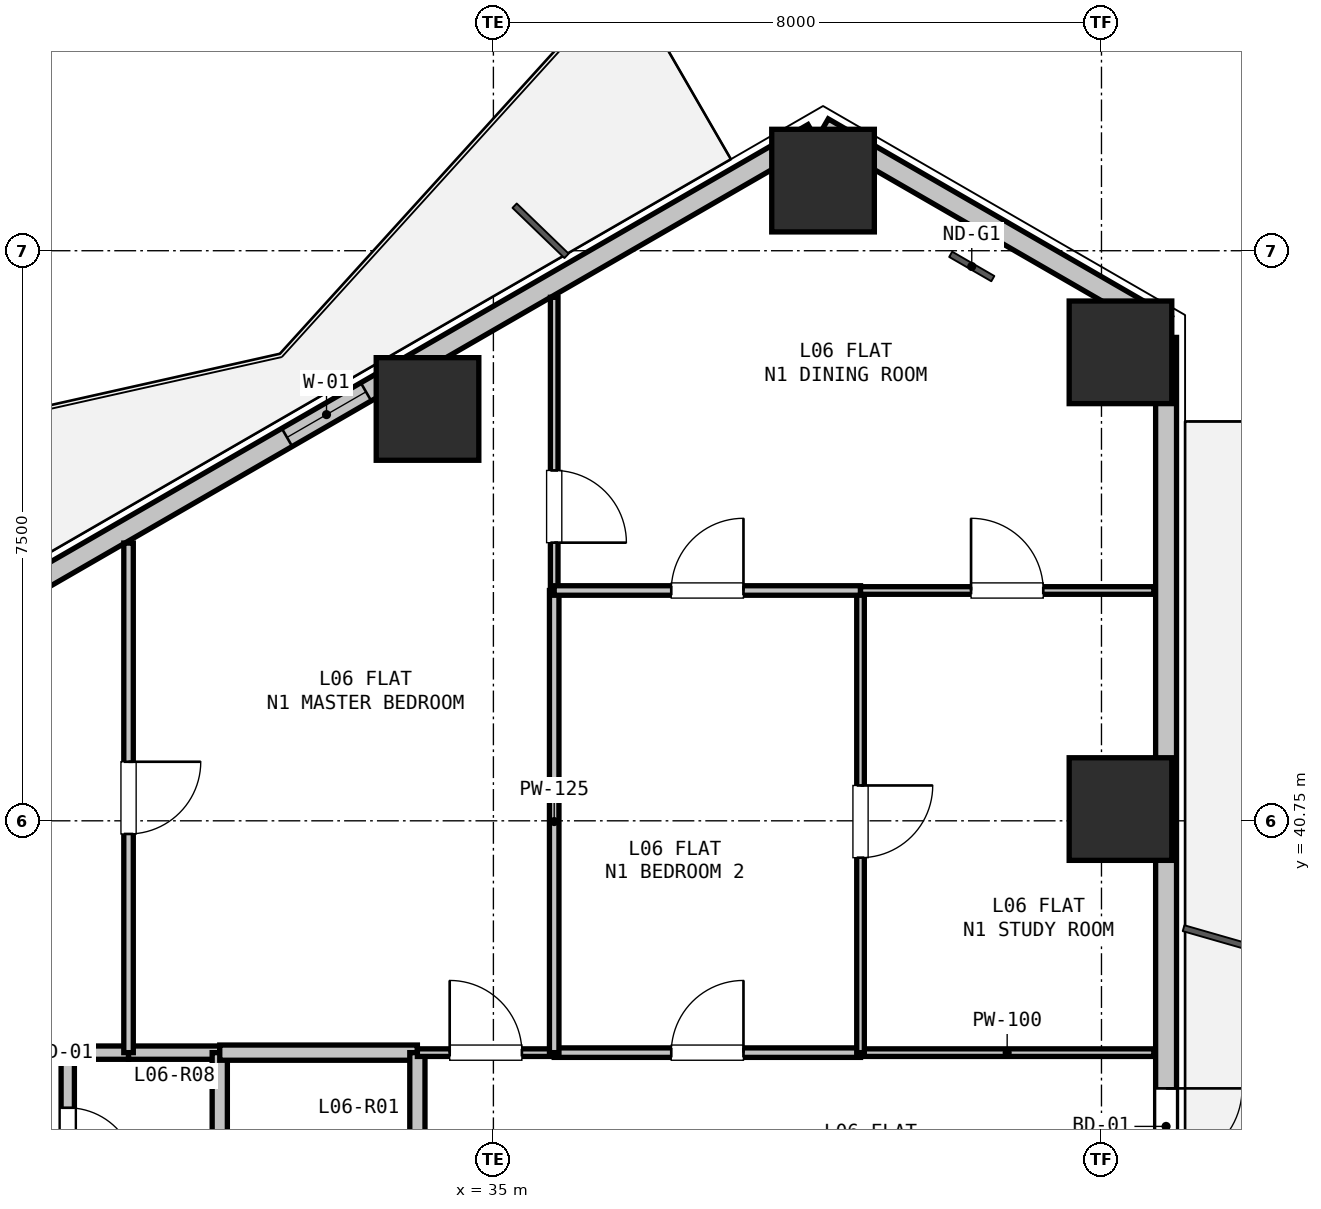
"""IFC4 building model, lengths in metres.
Left out: names, types, materials, properties, quantities, classifications, styles, units other than length and angle.
Written with IfcOpenShell. Run it as: python <this file> out.ifc"""

import sys

from ifc_helpers import new_model, si_unit, direction, frame, frame_2d, origin, origin_2d, place, context, subcontext, project, spatial, rectangle, hollow_rectangle, extrude, element, fill, save


model = new_model("IFC4")
c1 = context("Model", 3, precision=1e-05, world=origin(), true_north=direction((0.0, 1.0)))
c2 = subcontext(c1, "Body", "Model", "MODEL_VIEW")
j1 = project(units=[si_unit("LENGTHUNIT", "METRE"), si_unit("PLANEANGLEUNIT", "RADIAN")], contexts=[c1])
p1 = place(None, origin())
s1 = spatial("IfcSite", under=j1, at=p1, CompositionType="ELEMENT")
p2 = place(p1, origin())
s2 = spatial("IfcBuilding", under=s1, at=p2, CompositionType="ELEMENT")
p3 = place(p2, frame((0.0, 0.0, 25.8)))
s3 = spatial("IfcBuildingStorey", under=s2, at=p3, CompositionType="ELEMENT", Elevation=25.8)
for number, where, z_axis, x_axis in (
    (1, (34.133, 46.168, 0.0), (0.0, 0.0, 1.0), (1.0, 0.0, 0.0)),
    (2, (39.337, 49.173, 0.0), (0.0, 0.0, 1.0), (1.0, 0.0, 0.0)),
    (3, (43.25, 46.913, 0.0), (0.0, 0.0, 1.0), (1.0, 0.0, 0.0)),
    (4, (43.25, 40.905, 0.0), (0.0, 0.0, 1.0), (1.0, 0.0, 0.0)),
):
    element("IfcColumn", number, at=place(p3, frame(where, z_axis=z_axis, x_axis=x_axis)), inside=s3, PredefinedType="COLUMN", context=c2, shape_type="SweptSolid", body=[
        extrude(hollow_rectangle(XDim=1.35, YDim=1.35, WallThickness=0.036, at=origin_2d()), origin(), (0.0, 0.0, 1.0), 3.3),
    ])
p4 = place(p3, frame((39.337, 49.865, 0.0), z_axis=(0.0, 0.0, 1.0), x_axis=(0.866043601342, -0.499968479581, 0.0)))
e5 = element("IfcWall", 5, at=p4, inside=s3, PredefinedType="SOLIDWALL", context=c2, shape_type="SweptSolid", body=[
    extrude(rectangle(XDim=5.211, YDim=0.275, at=frame_2d((2.605, 0.0))), origin(), (0.0, 0.0, 1.0), 2.66),
])
p5 = place(p3, frame((28.232, 43.454, 0.0), z_axis=(0.0, 0.0, 1.0), x_axis=(0.86603192154, 0.499988710747, 0.0)))
e6 = element("IfcWall", 6, at=p5, inside=s3, PredefinedType="SOLIDWALL", context=c2, shape_type="SweptSolid", body=[
    extrude(rectangle(XDim=12.673, YDim=0.275, at=frame_2d((6.336, 0.0))), origin(), (0.0, 0.0, 1.0), 2.66),
])
p6 = place(p5, frame((4.68, 0.0, 0.9)))
e7 = element("IfcOpeningElement", 7, at=p6, cuts=e6, PredefinedType="OPENING", context=c2, shape_type="SweptSolid", body=[
    extrude(rectangle(XDim=1.2, YDim=1.4, at=frame_2d((0.6, 0.7))), frame((0.0, 0.147, 0.0), z_axis=(0.0, -1.0, 0.0), x_axis=(1.0, 0.0, 0.0)), (0.0, 0.0, 1.0), 0.295),
])
p7 = place(p3, frame((43.85, 47.11, 0.0), z_axis=(0.0, 0.0, 1.0), x_axis=(0.0, -1.0, 0.0)))
e8 = element("IfcWall", 8, at=p7, inside=s3, PredefinedType="SOLIDWALL", context=c2, shape_type="SweptSolid", body=[
    extrude(rectangle(XDim=12.673, YDim=0.275, at=frame_2d((6.336, 0.0))), origin(), (0.0, 0.0, 1.0), 2.66),
])
p8 = place(p7, frame((9.88, 0.0, 0.0)))
e9 = element("IfcOpeningElement", 9, at=p8, cuts=e8, PredefinedType="OPENING", context=c2, shape_type="SweptSolid", body=[
    extrude(rectangle(XDim=1.0, YDim=2.1, at=frame_2d((0.5, 1.05))), frame((0.0, 0.147, 0.0), z_axis=(0.0, -1.0, 0.0), x_axis=(1.0, 0.0, 0.0)), (0.0, 0.0, 1.0), 0.295),
])
p9 = place(p3, frame((26.8, 37.7, 0.0), z_axis=(0.0, 0.0, 1.0), x_axis=(1.0, 0.0, 0.0)))
e10 = element("IfcWall", 10, at=p9, inside=s3, PredefinedType="PARTITIONING", context=c2, shape_type="SweptSolid", body=[
    extrude(rectangle(XDim=2.6, YDim=0.1, at=frame_2d((1.3, 0.0))), origin(), (0.0, 0.0, 1.0), 3.04),
])
p10 = place(p9, frame((0.825, 0.0, 0.0)))
e11 = element("IfcOpeningElement", 11, at=p10, cuts=e10, PredefinedType="OPENING", context=c2, shape_type="SweptSolid", body=[
    extrude(rectangle(XDim=0.95, YDim=2.1, at=frame_2d((0.475, 1.05))), frame((0.0, 0.06, 0.0), z_axis=(0.0, -1.0, 0.0), x_axis=(1.0, 0.0, 0.0)), (0.0, 0.0, 1.0), 0.12),
])
p11 = place(p3, frame((29.4, 37.7, 0.0), z_axis=(0.0, 0.0, 1.0), x_axis=(0.0, -1.0, 0.0)))
e12 = element("IfcWall", 12, at=p11, inside=s3, PredefinedType="PLUMBINGWALL", context=c2, shape_type="SweptSolid", body=[
    extrude(rectangle(XDim=2.35, YDim=0.175, at=frame_2d((1.175, 0.0))), origin(), (0.0, 0.0, 1.0), 3.04),
])
p12 = place(p11, frame((0.725, 0.0, 0.0)))
e13 = element("IfcOpeningElement", 13, at=p12, cuts=e12, PredefinedType="OPENING", context=c2, shape_type="SweptSolid", body=[
    extrude(rectangle(XDim=0.9, YDim=2.1, at=frame_2d((0.45, 1.05))), frame((0.0, 0.097, 0.0), z_axis=(0.0, -1.0, 0.0), x_axis=(1.0, 0.0, 0.0)), (0.0, 0.0, 1.0), 0.195),
])
p13 = place(p3, frame((29.4, 37.7, 0.0), z_axis=(0.0, 0.0, 1.0), x_axis=(1.0, 0.0, 0.0)))
e14 = element("IfcWall", 14, at=p13, inside=s3, PredefinedType="PLUMBINGWALL", context=c2, shape_type="SweptSolid", body=[
    extrude(rectangle(XDim=0.8, YDim=0.175, at=frame_2d((0.4, 0.0))), origin(), (0.0, 0.0, 1.0), 3.04),
])
p14 = place(p3, frame((30.2, 37.7, 0.0), z_axis=(0.0, 0.0, 1.0), x_axis=(1.0, 0.0, 0.0)))
e15 = element("IfcWall", 15, at=p14, inside=s3, PredefinedType="PLUMBINGWALL", context=c2, shape_type="SweptSolid", body=[
    extrude(rectangle(XDim=1.2, YDim=0.175, at=frame_2d((0.6, 0.0))), origin(), (0.0, 0.0, 1.0), 3.04),
])
p15 = place(p3, frame((31.4, 37.7, 0.0), z_axis=(0.0, 0.0, 1.0), x_axis=(0.0, -1.0, 0.0)))
e16 = element("IfcWall", 16, at=p15, inside=s3, PredefinedType="PARTITIONING", context=c2, shape_type="SweptSolid", body=[
    extrude(rectangle(XDim=2.35, YDim=0.2, at=frame_2d((1.175, 0.0))), origin(), (0.0, 0.0, 1.0), 3.04),
])
p16 = place(p3, frame((31.4, 37.7, 0.0), z_axis=(0.0, 0.0, 1.0), x_axis=(1.0, 0.0, 0.0)))
e17 = element("IfcWall", 17, at=p16, inside=s3, PredefinedType="PARTITIONING", context=c2, shape_type="SweptSolid", body=[
    extrude(rectangle(XDim=2.6, YDim=0.2, at=frame_2d((1.3, 0.0))), origin(), (0.0, 0.0, 1.0), 3.04),
])
p17 = place(p3, frame((34.0, 37.7, 0.0), z_axis=(0.0, 0.0, 1.0), x_axis=(0.0, -1.0, 0.0)))
e18 = element("IfcWall", 18, at=p17, inside=s3, PredefinedType="PARTITIONING", context=c2, shape_type="SweptSolid", body=[
    extrude(rectangle(XDim=2.35, YDim=0.2, at=frame_2d((1.175, 0.0))), origin(), (0.0, 0.0, 1.0), 3.04),
])
p18 = place(p3, frame((34.0, 37.7, 0.0), z_axis=(0.0, 0.0, 1.0), x_axis=(1.0, 0.0, 0.0)))
e19 = element("IfcWall", 19, at=p18, inside=s3, PredefinedType="PARTITIONING", context=c2, shape_type="SweptSolid", body=[
    extrude(rectangle(XDim=1.8, YDim=0.1, at=frame_2d((0.9, 0.0))), origin(), (0.0, 0.0, 1.0), 3.04),
])
p19 = place(p18, frame((0.425, 0.0, 0.0)))
e20 = element("IfcOpeningElement", 20, at=p19, cuts=e19, PredefinedType="OPENING", context=c2, shape_type="SweptSolid", body=[
    extrude(rectangle(XDim=0.95, YDim=2.1, at=frame_2d((0.475, 1.05))), frame((0.0, 0.06, 0.0), z_axis=(0.0, -1.0, 0.0), x_axis=(1.0, 0.0, 0.0)), (0.0, 0.0, 1.0), 0.12),
])
p20 = place(p3, frame((35.8, 37.7, 0.0), z_axis=(0.0, 0.0, 1.0), x_axis=(1.0, 0.0, 0.0)))
e21 = element("IfcWall", 21, at=p20, inside=s3, PredefinedType="PARTITIONING", context=c2, shape_type="SweptSolid", body=[
    extrude(rectangle(XDim=4.03, YDim=0.125, at=frame_2d((2.015, 0.0))), origin(), (0.0, 0.0, 1.0), 2.337),
])
p21 = place(p20, frame((1.54, 0.0, 0.0)))
e22 = element("IfcOpeningElement", 22, at=p21, cuts=e21, PredefinedType="OPENING", context=c2, shape_type="SweptSolid", body=[
    extrude(rectangle(XDim=0.95, YDim=2.1, at=frame_2d((0.475, 1.05))), frame((0.0, 0.073, 0.0), z_axis=(0.0, -1.0, 0.0), x_axis=(1.0, 0.0, 0.0)), (0.0, 0.0, 1.0), 0.145),
])
p22 = place(p3, frame((39.83, 37.7, 0.0), z_axis=(0.0, 0.0, 1.0), x_axis=(1.0, 0.0, 0.0)))
e23 = element("IfcWall", 23, at=p22, inside=s3, PredefinedType="PARTITIONING", context=c2, shape_type="SweptSolid", body=[
    extrude(rectangle(XDim=3.858, YDim=0.1, at=frame_2d((1.929, 0.0))), origin(), (0.0, 0.0, 1.0), 2.337),
])
p23 = place(p3, frame((30.2, 44.404, 0.0), z_axis=(0.0, 0.0, 1.0), x_axis=(0.0, -1.0, 0.0)))
e24 = element("IfcWall", 24, at=p23, inside=s3, PredefinedType="PARTITIONING", context=c2, shape_type="SweptSolid", body=[
    extrude(rectangle(XDim=6.704, YDim=0.125, at=frame_2d((3.352, 0.0))), origin(), (0.0, 0.0, 1.0), 2.365),
])
p24 = place(p23, frame((2.877, 0.0, 0.0)))
e25 = element("IfcOpeningElement", 25, at=p24, cuts=e24, PredefinedType="OPENING", context=c2, shape_type="SweptSolid", body=[
    extrude(rectangle(XDim=0.95, YDim=2.1, at=frame_2d((0.475, 1.05))), frame((0.0, 0.073, 0.0), z_axis=(0.0, -1.0, 0.0), x_axis=(1.0, 0.0, 0.0)), (0.0, 0.0, 1.0), 0.145),
])
p25 = place(p3, frame((35.8, 47.637, 0.0), z_axis=(0.0, 0.0, 1.0), x_axis=(0.0, -1.0, 0.0)))
e26 = element("IfcWall", 26, at=p25, inside=s3, PredefinedType="PARTITIONING", context=c2, shape_type="SweptSolid", body=[
    extrude(rectangle(XDim=3.857, YDim=0.1, at=frame_2d((1.928, 0.0))), origin(), (0.0, 0.0, 1.0), 2.65),
])
p26 = place(p25, frame((2.277, 0.0, 0.0)))
e27 = element("IfcOpeningElement", 27, at=p26, cuts=e26, PredefinedType="OPENING", context=c2, shape_type="SweptSolid", body=[
    extrude(rectangle(XDim=0.95, YDim=2.1, at=frame_2d((0.475, 1.05))), frame((0.0, 0.06, 0.0), z_axis=(0.0, -1.0, 0.0), x_axis=(1.0, 0.0, 0.0)), (0.0, 0.0, 1.0), 0.12),
])
p27 = place(p3, frame((35.8, 43.78, 0.0), z_axis=(0.0, 0.0, 1.0), x_axis=(0.0, -1.0, 0.0)))
e28 = element("IfcWall", 28, at=p27, inside=s3, PredefinedType="PARTITIONING", context=c2, shape_type="SweptSolid", body=[
    extrude(rectangle(XDim=6.08, YDim=0.125, at=frame_2d((3.04, 0.0))), origin(), (0.0, 0.0, 1.0), 3.04),
])
p28 = place(p3, frame((39.83, 43.78, 0.0), z_axis=(0.0, 0.0, 1.0), x_axis=(0.0, -1.0, 0.0)))
e29 = element("IfcWall", 29, at=p28, inside=s3, PredefinedType="PARTITIONING", context=c2, shape_type="SweptSolid", body=[
    extrude(rectangle(XDim=6.08, YDim=0.1, at=frame_2d((3.04, 0.0))), origin(), (0.0, 0.0, 1.0), 3.04),
])
p29 = place(p28, frame((2.565, 0.0, 0.0)))
e30 = element("IfcOpeningElement", 30, at=p29, cuts=e29, PredefinedType="OPENING", context=c2, shape_type="SweptSolid", body=[
    extrude(rectangle(XDim=0.95, YDim=2.1, at=frame_2d((0.475, 1.05))), frame((0.0, 0.06, 0.0), z_axis=(0.0, -1.0, 0.0), x_axis=(1.0, 0.0, 0.0)), (0.0, 0.0, 1.0), 0.12),
])
p30 = place(p3, frame((35.8, 43.78, 0.0), z_axis=(0.0, 0.0, 1.0), x_axis=(1.0, 0.0, 0.0)))
e31 = element("IfcWall", 31, at=p30, inside=s3, PredefinedType="PARTITIONING", context=c2, shape_type="SweptSolid", body=[
    extrude(rectangle(XDim=4.03, YDim=0.125, at=frame_2d((2.015, 0.0))), origin(), (0.0, 0.0, 1.0), 2.337),
])
p31 = place(p30, frame((1.54, 0.0, 0.0)))
e32 = element("IfcOpeningElement", 32, at=p31, cuts=e31, PredefinedType="OPENING", context=c2, shape_type="SweptSolid", body=[
    extrude(rectangle(XDim=0.95, YDim=2.1, at=frame_2d((0.475, 1.05))), frame((0.0, 0.073, 0.0), z_axis=(0.0, -1.0, 0.0), x_axis=(1.0, 0.0, 0.0)), (0.0, 0.0, 1.0), 0.145),
])
p32 = place(p3, frame((39.83, 43.78, 0.0), z_axis=(0.0, 0.0, 1.0), x_axis=(1.0, 0.0, 0.0)))
e33 = element("IfcWall", 33, at=p32, inside=s3, PredefinedType="PARTITIONING", context=c2, shape_type="SweptSolid", body=[
    extrude(rectangle(XDim=3.858, YDim=0.1, at=frame_2d((1.929, 0.0))), origin(), (0.0, 0.0, 1.0), 2.65),
])
p33 = place(p32, frame((1.454, 0.0, 0.0)))
e34 = element("IfcOpeningElement", 34, at=p33, cuts=e33, PredefinedType="OPENING", context=c2, shape_type="SweptSolid", body=[
    extrude(rectangle(XDim=0.95, YDim=2.1, at=frame_2d((0.475, 1.05))), frame((0.0, 0.06, 0.0), z_axis=(0.0, -1.0, 0.0), x_axis=(1.0, 0.0, 0.0)), (0.0, 0.0, 1.0), 0.12),
])
p34 = place(p6, origin())
e35 = element("IfcWindow", 35, at=p34, inside=s3, PartitioningType="SINGLE_PANEL", PredefinedType="WINDOW", context=c2, shape_type="SweptSolid", body=[
    extrude(rectangle(XDim=1.2, YDim=1.4, at=frame_2d((0.6, 0.7))), frame((0.0, 0.03, 0.0), z_axis=(0.0, -1.0, 0.0), x_axis=(1.0, 0.0, 0.0)), (0.0, 0.0, 1.0), 0.06),
])
fill(e7, e35)
p35 = place(p8, origin())
e36 = element("IfcDoor", 36, at=p35, inside=s3, OperationType="SINGLE_SWING_LEFT", PredefinedType="DOOR", context=c2, shape_type="SweptSolid", body=[
    extrude(rectangle(XDim=1.0, YDim=2.1, at=frame_2d((0.5, 1.05))), frame((0.0, 0.025, 0.0), z_axis=(0.0, -1.0, 0.0), x_axis=(1.0, 0.0, 0.0)), (0.0, 0.0, 1.0), 0.05),
])
fill(e9, e36)
p36 = place(p12, origin())
e37 = element("IfcDoor", 37, at=p36, inside=s3, OperationType="SINGLE_SWING_RIGHT", PredefinedType="DOOR", context=c2, shape_type="SweptSolid", body=[
    extrude(rectangle(XDim=0.9, YDim=2.1, at=frame_2d((0.45, 1.05))), frame((0.0, 0.025, 0.0), z_axis=(0.0, -1.0, 0.0), x_axis=(1.0, 0.0, 0.0)), (0.0, 0.0, 1.0), 0.05),
])
fill(e13, e37)
p37 = place(p19, origin())
e38 = element("IfcDoor", 38, at=p37, inside=s3, OperationType="SINGLE_SWING_LEFT", PredefinedType="DOOR", context=c2, shape_type="SweptSolid", body=[
    extrude(rectangle(XDim=0.95, YDim=2.1, at=frame_2d((0.475, 1.05))), frame((0.0, 0.025, 0.0), z_axis=(0.0, -1.0, 0.0), x_axis=(1.0, 0.0, 0.0)), (0.0, 0.0, 1.0), 0.05),
])
fill(e20, e38)
p38 = place(p21, origin())
e39 = element("IfcDoor", 39, at=p38, inside=s3, OperationType="SINGLE_SWING_RIGHT", PredefinedType="DOOR", context=c2, shape_type="SweptSolid", body=[
    extrude(rectangle(XDim=0.95, YDim=2.1, at=frame_2d((0.475, 1.05))), frame((0.0, 0.025, 0.0), z_axis=(0.0, -1.0, 0.0), x_axis=(1.0, 0.0, 0.0)), (0.0, 0.0, 1.0), 0.05),
])
fill(e22, e39)
p39 = place(p24, origin())
e40 = element("IfcDoor", 40, at=p39, inside=s3, OperationType="SINGLE_SWING_LEFT", PredefinedType="DOOR", context=c2, shape_type="SweptSolid", body=[
    extrude(rectangle(XDim=0.95, YDim=2.1, at=frame_2d((0.475, 1.05))), frame((0.0, 0.025, 0.0), z_axis=(0.0, -1.0, 0.0), x_axis=(1.0, 0.0, 0.0)), (0.0, 0.0, 1.0), 0.05),
])
fill(e25, e40)
p40 = place(p26, origin())
e41 = element("IfcDoor", 41, at=p40, inside=s3, OperationType="SINGLE_SWING_RIGHT", PredefinedType="DOOR", context=c2, shape_type="SweptSolid", body=[
    extrude(rectangle(XDim=0.95, YDim=2.1, at=frame_2d((0.475, 1.05))), frame((0.0, 0.025, 0.0), z_axis=(0.0, -1.0, 0.0), x_axis=(1.0, 0.0, 0.0)), (0.0, 0.0, 1.0), 0.05),
])
fill(e27, e41)
p41 = place(p29, origin())
e42 = element("IfcDoor", 42, at=p41, inside=s3, OperationType="SINGLE_SWING_LEFT", PredefinedType="DOOR", context=c2, shape_type="SweptSolid", body=[
    extrude(rectangle(XDim=0.95, YDim=2.1, at=frame_2d((0.475, 1.05))), frame((0.0, 0.025, 0.0), z_axis=(0.0, -1.0, 0.0), x_axis=(1.0, 0.0, 0.0)), (0.0, 0.0, 1.0), 0.05),
])
fill(e30, e42)
p42 = place(p31, origin())
e43 = element("IfcDoor", 43, at=p42, inside=s3, OperationType="SINGLE_SWING_RIGHT", PredefinedType="DOOR", context=c2, shape_type="SweptSolid", body=[
    extrude(rectangle(XDim=0.95, YDim=2.1, at=frame_2d((0.475, 1.05))), frame((0.0, 0.025, 0.0), z_axis=(0.0, -1.0, 0.0), x_axis=(1.0, 0.0, 0.0)), (0.0, 0.0, 1.0), 0.05),
])
fill(e32, e43)
p43 = place(p33, origin())
e44 = element("IfcDoor", 44, at=p43, inside=s3, OperationType="SINGLE_SWING_LEFT", PredefinedType="DOOR", context=c2, shape_type="SweptSolid", body=[
    extrude(rectangle(XDim=0.95, YDim=2.1, at=frame_2d((0.475, 1.05))), frame((0.0, 0.025, 0.0), z_axis=(0.0, -1.0, 0.0), x_axis=(1.0, 0.0, 0.0)), (0.0, 0.0, 1.0), 0.05),
])
fill(e34, e44)
save(model, sys.argv[1])
